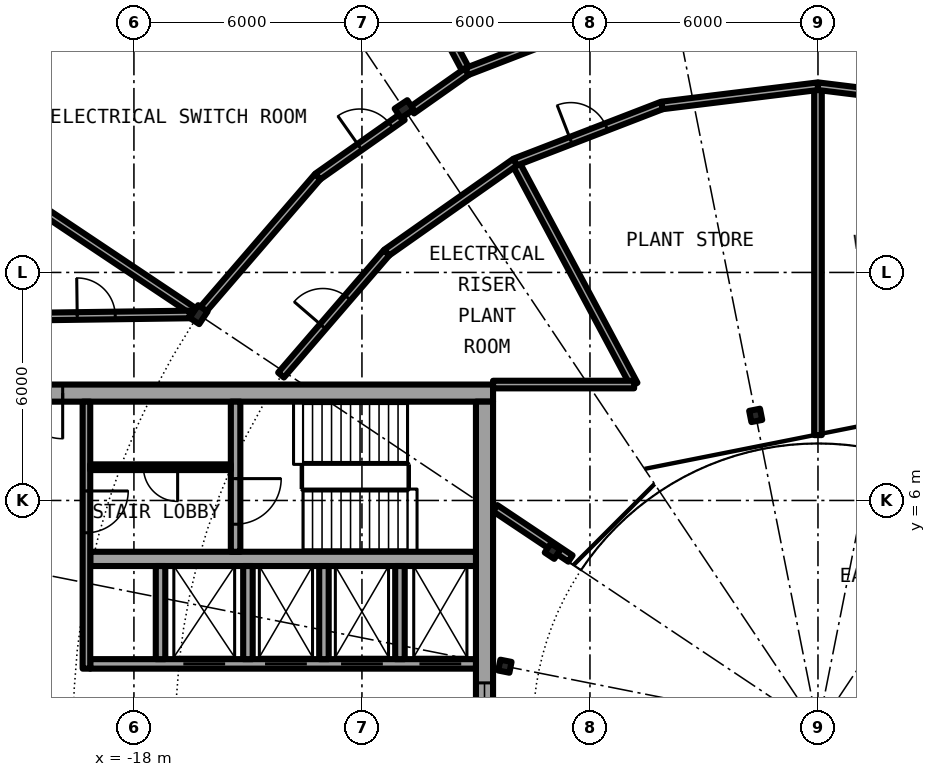
"""IFC4 building model, lengths in metres.
Left out: names, types, materials, properties, quantities, classifications, styles, units other than length and angle.
Written with IfcOpenShell. Run it as: python <this file> out.ifc"""

import sys

from ifc_helpers import new_model, si_unit, direction, frame, frame_2d, origin, origin_2d, place, context, subcontext, project, spatial, rectangle, i_section, extrude, element, fill, save


model = new_model("IFC4")
c1 = context("Model", 3, precision=1e-05, world=origin(), true_north=direction((0.0, 1.0)))
c2 = subcontext(c1, "Body", "Model", "MODEL_VIEW")
j1 = project(units=[si_unit("LENGTHUNIT", "METRE"), si_unit("PLANEANGLEUNIT", "RADIAN")], contexts=[c1])
p1 = place(None, origin())
s1 = spatial("IfcSite", under=j1, at=p1, CompositionType="ELEMENT")
p2 = place(p1, origin())
s2 = spatial("IfcBuilding", under=s1, at=p2, CompositionType="ELEMENT")
p3 = place(p2, frame((0.0, 0.0, 186.0)))
s3 = spatial("IfcBuildingStorey", under=s2, at=p3, CompositionType="ELEMENT", Elevation=186.0)
for number, where, z_axis, x_axis in (
    (1, (-10.889, 16.297, 0.0), (0.0, 0.0, 1.0), (-0.556, 0.831, 0.0)),
    (2, (-16.297, 10.889, 0.0), (0.0, 0.0, 1.0), (-0.831, 0.556, 0.0)),
):
    element("IfcColumn", number, at=place(p3, frame(where, z_axis=z_axis, x_axis=x_axis)), inside=s3, PredefinedType="COLUMN", context=c2, shape_type="SweptSolid", body=[
        extrude(i_section(OverallWidth=0.3, OverallDepth=0.4, WebThickness=0.013, FlangeThickness=0.024, FilletRadius=0.027, at=origin_2d()), origin(), (0.0, 0.0, 1.0), 4.2),
    ])
for number, where, z_axis, x_axis in (
    (3, (-1.639, 8.239, 0.0), (0.0, 0.0, 1.0), (-0.195, 0.981, 0.0)),
    (4, (-6.984, 4.667, 0.0), (0.0, 0.0, 1.0), (-0.831, 0.556, 0.0)),
    (5, (-8.239, 1.639, 0.0), (0.0, 0.0, 1.0), (-0.981, 0.195, 0.0)),
):
    element("IfcColumn", number, at=place(p3, frame(where, z_axis=z_axis, x_axis=x_axis)), inside=s3, PredefinedType="COLUMN", context=c2, shape_type="SweptSolid", body=[
        extrude(i_section(OverallWidth=0.3, OverallDepth=0.29, WebThickness=0.009, FlangeThickness=0.014, FilletRadius=0.027, at=origin_2d()), origin(), (0.0, 0.0, 1.0), 4.2),
    ])
p4 = place(p3, frame((-8.55, 8.825, 0.0), z_axis=(0.0, 0.0, 1.0), x_axis=(-1.0, 0.0, 0.0)))
e6 = element("IfcWall", 6, at=p4, inside=s3, PredefinedType="SHEAR", context=c2, shape_type="SweptSolid", body=[
    extrude(rectangle(XDim=13.5, YDim=0.45, at=frame_2d((6.75, 0.0))), origin(), (0.0, 0.0, 1.0), 4.2),
])
p5 = place(p4, frame((11.325, 0.0, 0.0)))
e7 = element("IfcOpeningElement", 7, at=p5, cuts=e6, PredefinedType="OPENING", context=c2, shape_type="SweptSolid", body=[
    extrude(rectangle(XDim=1.2, YDim=2.3, at=frame_2d((0.6, 1.15))), frame((0.0, 0.235, 0.0), z_axis=(0.0, -1.0, 0.0), x_axis=(1.0, 0.0, 0.0)), (0.0, 0.0, 1.0), 0.47),
])
p6 = place(p3, frame((-8.775, 8.6, 0.0), z_axis=(0.0, 0.0, 1.0), x_axis=(0.0, -1.0, 0.0)))
e8 = element("IfcWall", 8, at=p6, inside=s3, PredefinedType="SHEAR", context=c2, shape_type="SweptSolid", body=[
    extrude(rectangle(XDim=17.2, YDim=0.45, at=frame_2d((8.6, 0.0))), origin(), (0.0, 0.0, 1.0), 4.2),
])
p7 = place(p6, frame((7.4, 0.0, 0.1)))
e9 = element("IfcOpeningElement", 9, at=p7, cuts=e8, PredefinedType="OPENING", context=c2, shape_type="SweptSolid", body=[
    extrude(rectangle(XDim=2.4, YDim=2.2, at=frame_2d((1.2, 1.1))), frame((0.0, 0.235, 0.0), z_axis=(0.0, -1.0, 0.0), x_axis=(1.0, 0.0, 0.0)), (0.0, 0.0, 1.0), 0.47),
])
p8 = place(p3, frame((-9.0, 1.7, 0.0), z_axis=(0.0, 0.0, 1.0), x_axis=(-1.0, 0.0, 0.0)))
e10 = element("IfcWall", 10, at=p8, inside=s3, PredefinedType="SHEAR", context=c2, shape_type="SweptSolid", body=[
    extrude(rectangle(XDim=10.15, YDim=0.25, at=frame_2d((5.075, 0.0))), origin(), (0.0, 0.0, 1.0), 4.2),
])
p9 = place(p8, frame((0.387, 0.0, 0.0)))
e11 = element("IfcOpeningElement", 11, at=p9, cuts=e10, PredefinedType="OPENING", context=c2, shape_type="SweptSolid", body=[
    extrude(rectangle(XDim=1.1, YDim=2.3, at=frame_2d((0.55, 1.15))), frame((0.0, 0.135, 0.0), z_axis=(0.0, -1.0, 0.0), x_axis=(1.0, 0.0, 0.0)), (0.0, 0.0, 1.0), 0.27),
])
p10 = place(p8, frame((2.45, 0.0, 0.0)))
e12 = element("IfcOpeningElement", 12, at=p10, cuts=e10, PredefinedType="OPENING", context=c2, shape_type="SweptSolid", body=[
    extrude(rectangle(XDim=1.1, YDim=2.3, at=frame_2d((0.55, 1.15))), frame((0.0, 0.135, 0.0), z_axis=(0.0, -1.0, 0.0), x_axis=(1.0, 0.0, 0.0)), (0.0, 0.0, 1.0), 0.27),
])
p11 = place(p8, frame((4.45, 0.0, 0.0)))
e13 = element("IfcOpeningElement", 13, at=p11, cuts=e10, PredefinedType="OPENING", context=c2, shape_type="SweptSolid", body=[
    extrude(rectangle(XDim=1.1, YDim=2.3, at=frame_2d((0.55, 1.15))), frame((0.0, 0.135, 0.0), z_axis=(0.0, -1.0, 0.0), x_axis=(1.0, 0.0, 0.0)), (0.0, 0.0, 1.0), 0.27),
])
p12 = place(p8, frame((6.6, 0.0, 0.0)))
e14 = element("IfcOpeningElement", 14, at=p12, cuts=e10, PredefinedType="OPENING", context=c2, shape_type="SweptSolid", body=[
    extrude(rectangle(XDim=1.1, YDim=2.3, at=frame_2d((0.55, 1.15))), frame((0.0, 0.135, 0.0), z_axis=(0.0, -1.0, 0.0), x_axis=(1.0, 0.0, 0.0)), (0.0, 0.0, 1.0), 0.27),
])
p13 = place(p3, frame((-9.0, 4.462, 0.0), z_axis=(0.0, 0.0, 1.0), x_axis=(-1.0, 0.0, 0.0)))
e15 = element("IfcWall", 15, at=p13, inside=s3, PredefinedType="SHEAR", context=c2, shape_type="SweptSolid", body=[
    extrude(rectangle(XDim=10.15, YDim=0.375, at=frame_2d((5.075, 0.0))), origin(), (0.0, 0.0, 1.0), 4.2),
])
p14 = place(p3, frame((-15.325, 8.6, 0.0), z_axis=(0.0, 0.0, 1.0), x_axis=(0.0, -1.0, 0.0)))
e16 = element("IfcWall", 16, at=p14, inside=s3, PredefinedType="SHEAR", context=c2, shape_type="SweptSolid", body=[
    extrude(rectangle(XDim=3.95, YDim=0.25, at=frame_2d((1.975, 0.0))), origin(), (0.0, 0.0, 1.0), 4.2),
])
p15 = place(p14, frame((2.025, 0.0, 0.0)))
e17 = element("IfcOpeningElement", 17, at=p15, cuts=e16, PredefinedType="OPENING", context=c2, shape_type="SweptSolid", body=[
    extrude(rectangle(XDim=1.2, YDim=2.3, at=frame_2d((0.6, 1.15))), frame((0.0, 0.135, 0.0), z_axis=(0.0, -1.0, 0.0), x_axis=(1.0, 0.0, 0.0)), (0.0, 0.0, 1.0), 0.27),
])
for number, where, z_axis, x_axis in (
    (18, (-15.0, 1.825, 0.0), (0.0, 0.0, 1.0), (0.0, 1.0, 0.0)),
    (19, (-17.3, 1.825, 0.0), (0.0, 0.0, 1.0), (0.0, 1.0, 0.0)),
):
    element("IfcWall", number, at=place(p3, frame(where, z_axis=z_axis, x_axis=x_axis)), inside=s3, PredefinedType="SOLIDWALL", context=c2, shape_type="SweptSolid", body=[
        extrude(rectangle(XDim=2.45, YDim=0.25, at=frame_2d((1.225, 0.0))), origin(), (0.0, 0.0, 1.0), 3.85),
    ])
p16 = place(p3, frame((-19.25, 8.6, 0.0), z_axis=(0.0, 0.0, 1.0), x_axis=(0.0, -1.0, 0.0)))
e20 = element("IfcWall", 20, at=p16, inside=s3, PredefinedType="SOLIDWALL", context=c2, shape_type="SweptSolid", body=[
    extrude(rectangle(XDim=7.025, YDim=0.2, at=frame_2d((3.513, 0.0))), origin(), (0.0, 0.0, 1.0), 3.85),
])
p17 = place(p16, frame((2.35, 0.0, 0.0)))
e21 = element("IfcOpeningElement", 21, at=p17, cuts=e20, PredefinedType="OPENING", context=c2, shape_type="SweptSolid", body=[
    extrude(rectangle(XDim=1.1, YDim=2.3, at=frame_2d((0.55, 1.15))), frame((0.0, 0.11, 0.0), z_axis=(0.0, -1.0, 0.0), x_axis=(1.0, 0.0, 0.0)), (0.0, 0.0, 1.0), 0.22),
])
for number, where, z_axis, x_axis in (
    (22, (-11.0, 1.825, 0.0), (0.0, 0.0, 1.0), (0.0, 1.0, 0.0)),
    (23, (-13.0, 1.825, 0.0), (0.0, 0.0, 1.0), (0.0, 1.0, 0.0)),
):
    element("IfcWall", number, at=place(p3, frame(where, z_axis=z_axis, x_axis=x_axis)), inside=s3, PredefinedType="SOLIDWALL", context=c2, shape_type="SweptSolid", body=[
        extrude(rectangle(XDim=2.45, YDim=0.25, at=frame_2d((1.225, 0.0))), origin(), (0.0, 0.0, 1.0), 3.85),
    ])
p18 = place(p3, frame((-15.45, 6.875, 0.0), z_axis=(0.0, 0.0, 1.0), x_axis=(-1.0, 0.0, 0.0)))
e24 = element("IfcWall", 24, at=p18, inside=s3, PredefinedType="PARTITIONING", context=c2, shape_type="SweptSolid", body=[
    extrude(rectangle(XDim=3.7, YDim=0.15, at=frame_2d((1.85, 0.0))), origin(), (0.0, 0.0, 1.0), 3.85),
])
p19 = place(p18, frame((1.4, 0.0, 0.0)))
e25 = element("IfcOpeningElement", 25, at=p19, cuts=e24, PredefinedType="OPENING", context=c2, shape_type="SweptSolid", body=[
    extrude(rectangle(XDim=0.9, YDim=2.3, at=frame_2d((0.45, 1.15))), frame((0.0, 0.085, 0.0), z_axis=(0.0, -1.0, 0.0), x_axis=(1.0, 0.0, 0.0)), (0.0, 0.0, 1.0), 0.17),
])
p20 = place(p3, frame((-22.595, 15.098, 0.0), z_axis=(0.0, 0.0, 1.0), x_axis=(0.831433566583, -0.555624175463, 0.0)))
e26 = element("IfcWall", 26, at=p20, inside=s3, PredefinedType="PARTITIONING", context=c2, shape_type="SweptSolid", body=[
    extrude(rectangle(XDim=7.375, YDim=0.2, at=frame_2d((3.688, 0.0))), origin(), (0.0, 0.0, 1.0), 3.85),
])
p21 = place(p3, frame((-12.813, 23.965, 0.0), z_axis=(0.0, 0.0, 1.0), x_axis=(0.471439510802, -0.881898399848, 0.0)))
e27 = element("IfcWall", 27, at=p21, inside=s3, PredefinedType="PARTITIONING", context=c2, shape_type="SweptSolid", body=[
    extrude(rectangle(XDim=7.575, YDim=0.2, at=frame_2d((3.787, 0.0))), origin(), (0.0, 0.0, 1.0), 3.85),
])
p22 = place(p3, frame((-7.969, 14.903, 0.0), z_axis=(0.0, 0.0, 1.0), x_axis=(0.471496623847, -0.88186786635, 0.0)))
e28 = element("IfcWall", 28, at=p22, inside=s3, PredefinedType="PARTITIONING", context=c2, shape_type="SweptSolid", body=[
    extrude(rectangle(XDim=6.638, YDim=0.2, at=frame_2d((3.319, 0.0))), origin(), (0.0, 0.0, 1.0), 3.85),
])
p23 = place(p3, frame((0.0, 7.72, 0.0), z_axis=(0.0, 0.0, 1.0), x_axis=(0.0, 1.0, 0.0)))
e29 = element("IfcWall", 29, at=p23, inside=s3, PredefinedType="PARTITIONING", context=c2, shape_type="SweptSolid", body=[
    extrude(rectangle(XDim=9.18, YDim=0.2, at=frame_2d((4.59, 0.0))), origin(), (0.0, 0.0, 1.0), 3.85),
])
p24 = place(p3, frame((-6.513, 4.472, 0.0), z_axis=(0.0, 0.0, 1.0), x_axis=(-0.831403409976, 0.555669299026, 0.0)))
e30 = element("IfcWall", 30, at=p24, inside=s3, PredefinedType="PARTITIONING", context=c2, shape_type="SweptSolid", body=[
    extrude(rectangle(XDim=2.383, YDim=0.2, at=frame_2d((1.191, 0.0))), origin(), (0.0, 0.0, 1.0), 3.85),
])
p25 = place(p3, frame((-8.55, 9.05, 0.0), z_axis=(0.0, 0.0, 1.0), x_axis=(1.0, 0.0, 0.0)))
e31 = element("IfcWall", 31, at=p25, inside=s3, PredefinedType="PARTITIONING", context=c2, shape_type="SweptSolid", body=[
    extrude(rectangle(XDim=3.712, YDim=0.2, at=frame_2d((1.856, 0.0))), origin(), (0.0, 0.0, 1.0), 3.85),
])
p26 = place(p3, frame((-21.675, 10.825, 0.0), z_axis=(0.0, 0.0, 1.0), x_axis=(0.999909707888, 0.013437859594, 0.0)))
e32 = element("IfcWall", 32, at=p26, inside=s3, PredefinedType="PARTITIONING", context=c2, shape_type="SweptSolid", body=[
    extrude(rectangle(XDim=5.142, YDim=0.2, at=frame_2d((2.571, 0.0))), origin(), (0.0, 0.0, 1.0), 3.85),
])
p27 = place(p26, frame((2.183, 0.0, 0.0)))
e33 = element("IfcOpeningElement", 33, at=p27, cuts=e32, PredefinedType="OPENING", context=c2, shape_type="SweptSolid", body=[
    extrude(rectangle(XDim=1.0, YDim=2.3, at=frame_2d((0.5, 1.15))), frame((0.0, 0.11, 0.0), z_axis=(0.0, -1.0, 0.0), x_axis=(1.0, 0.0, 0.0)), (0.0, 0.0, 1.0), 0.22),
])
p28 = place(p3, frame((-14.129, 9.3, 0.0), z_axis=(0.0, 0.0, 1.0), x_axis=(0.65324486504, 0.757146713853, 0.0)))
e34 = element("IfcWall", 34, at=p28, inside=s3, PredefinedType="PARTITIONING", context=c2, shape_type="SweptSolid", body=[
    extrude(rectangle(XDim=4.255, YDim=0.2, at=frame_2d((2.128, 0.0))), origin(), (0.0, 0.0, 1.0), 3.85),
])
p29 = place(p28, frame((1.687, 0.0, 0.0)))
e35 = element("IfcOpeningElement", 35, at=p29, cuts=e34, PredefinedType="OPENING", context=c2, shape_type="SweptSolid", body=[
    extrude(rectangle(XDim=1.0, YDim=2.3, at=frame_2d((0.5, 1.15))), frame((0.0, 0.11, 0.0), z_axis=(0.0, -1.0, 0.0), x_axis=(1.0, 0.0, 0.0)), (0.0, 0.0, 1.0), 0.22),
])
p30 = place(p3, frame((-11.349, 12.522, 0.0), z_axis=(0.0, 0.0, 1.0), x_axis=(0.817567680547, 0.575832517079, 0.0)))
e36 = element("IfcWall", 36, at=p30, inside=s3, PredefinedType="PARTITIONING", context=c2, shape_type="SweptSolid", body=[
    extrude(rectangle(XDim=4.137, YDim=0.2, at=frame_2d((2.068, 0.0))), origin(), (0.0, 0.0, 1.0), 3.85),
])
p31 = place(p3, frame((-7.967, 14.904, 0.0), z_axis=(0.0, 0.0, 1.0), x_axis=(0.932943640288, 0.360022449363, 0.0)))
e37 = element("IfcWall", 37, at=p31, inside=s3, PredefinedType="PARTITIONING", context=c2, shape_type="SweptSolid", body=[
    extrude(rectangle(XDim=4.139, YDim=0.2, at=frame_2d((2.069, 0.0))), origin(), (0.0, 0.0, 1.0), 3.85),
])
p32 = place(p31, frame((1.569, 0.0, 0.0)))
e38 = element("IfcOpeningElement", 38, at=p32, cuts=e37, PredefinedType="OPENING", context=c2, shape_type="SweptSolid", body=[
    extrude(rectangle(XDim=1.0, YDim=2.3, at=frame_2d((0.5, 1.15))), frame((0.0, 0.11, 0.0), z_axis=(0.0, -1.0, 0.0), x_axis=(1.0, 0.0, 0.0)), (0.0, 0.0, 1.0), 0.22),
])
for number, where, z_axis, x_axis in (
    (39, (-4.106, 16.394, 0.0), (0.0, 0.0, 1.0), (0.992, 0.122, 0.0)),
    (40, (0.0, 16.9, 0.0), (0.0, 0.0, 1.0), (0.992, -0.122, 0.0)),
):
    element("IfcWall", number, at=place(p3, frame(where, z_axis=z_axis, x_axis=x_axis)), inside=s3, PredefinedType="PARTITIONING", context=c2, shape_type="SweptSolid", body=[
        extrude(rectangle(XDim=4.137, YDim=0.2, at=frame_2d((2.068, 0.0))), origin(), (0.0, 0.0, 1.0), 3.85),
    ])
p33 = place(p3, frame((-16.198, 11.004, 0.0), z_axis=(0.0, 0.0, 1.0), x_axis=(0.653094461639, 0.757276451619, 0.0)))
e41 = element("IfcWall", 41, at=p33, inside=s3, PredefinedType="PARTITIONING", context=c2, shape_type="SweptSolid", body=[
    extrude(rectangle(XDim=4.647, YDim=0.2, at=frame_2d((2.323, 0.0))), origin(), (0.0, 0.0, 1.0), 3.6),
])
p34 = place(p3, frame((-13.163, 14.523, 0.0), z_axis=(0.0, 0.0, 1.0), x_axis=(0.817664396292, 0.57569517545, 0.0)))
e42 = element("IfcWall", 42, at=p34, inside=s3, PredefinedType="PARTITIONING", context=c2, shape_type="SweptSolid", body=[
    extrude(rectangle(XDim=2.727, YDim=0.2, at=frame_2d((1.364, 0.0))), origin(), (0.0, 0.0, 1.0), 3.6),
])
p35 = place(p34, frame((1.35, 0.0, 0.0)))
e43 = element("IfcOpeningElement", 43, at=p35, cuts=e42, PredefinedType="OPENING", context=c2, shape_type="SweptSolid", body=[
    extrude(rectangle(XDim=1.0, YDim=2.3, at=frame_2d((0.5, 1.15))), frame((0.0, 0.11, 0.0), z_axis=(0.0, -1.0, 0.0), x_axis=(1.0, 0.0, 0.0)), (0.0, 0.0, 1.0), 0.22),
])
p36 = place(p3, frame((-10.688, 16.266, 0.0), z_axis=(0.0, 0.0, 1.0), x_axis=(0.817772792535, 0.575541188613, 0.0)))
e44 = element("IfcWall", 44, at=p36, inside=s3, PredefinedType="PARTITIONING", context=c2, shape_type="SweptSolid", body=[
    extrude(rectangle(XDim=1.772, YDim=0.2, at=frame_2d((0.886, 0.0))), origin(), (0.0, 0.0, 1.0), 3.6),
])
p37 = place(p3, frame((-9.239, 17.286, 0.0), z_axis=(0.0, 0.0, 1.0), x_axis=(0.932988479706, 0.359906233255, 0.0)))
e45 = element("IfcWall", 45, at=p37, inside=s3, PredefinedType="PARTITIONING", context=c2, shape_type="SweptSolid", body=[
    extrude(rectangle(XDim=4.799, YDim=0.2, at=frame_2d((2.399, 0.0))), origin(), (0.0, 0.0, 1.0), 3.85),
])
p38 = place(p37, frame((1.899, 0.0, 0.0)))
e46 = element("IfcOpeningElement", 46, at=p38, cuts=e45, PredefinedType="OPENING", context=c2, shape_type="SweptSolid", body=[
    extrude(rectangle(XDim=1.0, YDim=2.3, at=frame_2d((0.5, 1.15))), frame((0.0, 0.11, 0.0), z_axis=(0.0, -1.0, 0.0), x_axis=(1.0, 0.0, 0.0)), (0.0, 0.0, 1.0), 0.22),
])
p39 = place(p9, origin())
e47 = element("IfcDoor", 47, at=p39, inside=s3, OperationType="DOUBLE_DOOR_SLIDING", PredefinedType="DOOR", context=c2, shape_type="SweptSolid", body=[
    extrude(rectangle(XDim=1.1, YDim=2.3, at=frame_2d((0.55, 1.15))), frame((0.0, 0.025, 0.0), z_axis=(0.0, -1.0, 0.0), x_axis=(1.0, 0.0, 0.0)), (0.0, 0.0, 1.0), 0.05),
])
fill(e11, e47)
p40 = place(p10, origin())
e48 = element("IfcDoor", 48, at=p40, inside=s3, OperationType="DOUBLE_DOOR_SLIDING", PredefinedType="DOOR", context=c2, shape_type="SweptSolid", body=[
    extrude(rectangle(XDim=1.1, YDim=2.3, at=frame_2d((0.55, 1.15))), frame((0.0, 0.025, 0.0), z_axis=(0.0, -1.0, 0.0), x_axis=(1.0, 0.0, 0.0)), (0.0, 0.0, 1.0), 0.05),
])
fill(e12, e48)
p41 = place(p11, origin())
e49 = element("IfcDoor", 49, at=p41, inside=s3, OperationType="DOUBLE_DOOR_SLIDING", PredefinedType="DOOR", context=c2, shape_type="SweptSolid", body=[
    extrude(rectangle(XDim=1.1, YDim=2.3, at=frame_2d((0.55, 1.15))), frame((0.0, 0.025, 0.0), z_axis=(0.0, -1.0, 0.0), x_axis=(1.0, 0.0, 0.0)), (0.0, 0.0, 1.0), 0.05),
])
fill(e13, e49)
p42 = place(p12, origin())
e50 = element("IfcDoor", 50, at=p42, inside=s3, OperationType="DOUBLE_DOOR_SLIDING", PredefinedType="DOOR", context=c2, shape_type="SweptSolid", body=[
    extrude(rectangle(XDim=1.1, YDim=2.3, at=frame_2d((0.55, 1.15))), frame((0.0, 0.025, 0.0), z_axis=(0.0, -1.0, 0.0), x_axis=(1.0, 0.0, 0.0)), (0.0, 0.0, 1.0), 0.05),
])
fill(e14, e50)
p43 = place(p19, origin())
e51 = element("IfcDoor", 51, at=p43, inside=s3, OperationType="SINGLE_SWING_LEFT", PredefinedType="DOOR", context=c2, shape_type="SweptSolid", body=[
    extrude(rectangle(XDim=0.9, YDim=2.3, at=frame_2d((0.45, 1.15))), frame((0.0, 0.025, 0.0), z_axis=(0.0, -1.0, 0.0), x_axis=(1.0, 0.0, 0.0)), (0.0, 0.0, 1.0), 0.05),
])
fill(e25, e51)
p44 = place(p15, origin())
e52 = element("IfcDoor", 52, at=p44, inside=s3, OperationType="SINGLE_SWING_LEFT", PredefinedType="DOOR", context=c2, shape_type="SweptSolid", body=[
    extrude(rectangle(XDim=1.2, YDim=2.3, at=frame_2d((0.6, 1.15))), frame((0.0, 0.025, 0.0), z_axis=(0.0, -1.0, 0.0), x_axis=(1.0, 0.0, 0.0)), (0.0, 0.0, 1.0), 0.05),
])
fill(e17, e52)
p45 = place(p17, origin())
e53 = element("IfcDoor", 53, at=p45, inside=s3, OperationType="SINGLE_SWING_RIGHT", PredefinedType="DOOR", context=c2, shape_type="SweptSolid", body=[
    extrude(rectangle(XDim=1.1, YDim=2.3, at=frame_2d((0.55, 1.15))), frame((0.0, 0.025, 0.0), z_axis=(0.0, -1.0, 0.0), x_axis=(1.0, 0.0, 0.0)), (0.0, 0.0, 1.0), 0.05),
])
fill(e21, e53)
p46 = place(p5, origin())
e54 = element("IfcDoor", 54, at=p46, inside=s3, OperationType="SINGLE_SWING_LEFT", PredefinedType="DOOR", context=c2, shape_type="SweptSolid", body=[
    extrude(rectangle(XDim=1.2, YDim=2.3, at=frame_2d((0.6, 1.15))), frame((0.0, 0.025, 0.0), z_axis=(0.0, -1.0, 0.0), x_axis=(1.0, 0.0, 0.0)), (0.0, 0.0, 1.0), 0.05),
])
fill(e7, e54)
p47 = place(p7, origin())
e55 = element("IfcWindow", 55, at=p47, inside=s3, PartitioningType="SINGLE_PANEL", PredefinedType="WINDOW", context=c2, shape_type="SweptSolid", body=[
    extrude(rectangle(XDim=2.4, YDim=2.2, at=frame_2d((1.2, 1.1))), frame((0.0, 0.03, 0.0), z_axis=(0.0, -1.0, 0.0), x_axis=(1.0, 0.0, 0.0)), (0.0, 0.0, 1.0), 0.06),
])
fill(e9, e55)
p48 = place(p35, origin())
e56 = element("IfcDoor", 56, at=p48, inside=s3, OperationType="SINGLE_SWING_RIGHT", PredefinedType="DOOR", context=c2, shape_type="SweptSolid", body=[
    extrude(rectangle(XDim=1.0, YDim=2.3, at=frame_2d((0.5, 1.15))), frame((0.0, 0.025, 0.0), z_axis=(0.0, -1.0, 0.0), x_axis=(1.0, 0.0, 0.0)), (0.0, 0.0, 1.0), 0.05),
])
fill(e43, e56)
p49 = place(p32, origin())
e57 = element("IfcDoor", 57, at=p49, inside=s3, OperationType="SINGLE_SWING_RIGHT", PredefinedType="DOOR", context=c2, shape_type="SweptSolid", body=[
    extrude(rectangle(XDim=1.0, YDim=2.3, at=frame_2d((0.5, 1.15))), frame((0.0, 0.025, 0.0), z_axis=(0.0, -1.0, 0.0), x_axis=(1.0, 0.0, 0.0)), (0.0, 0.0, 1.0), 0.05),
])
fill(e38, e57)
p50 = place(p29, origin())
e58 = element("IfcDoor", 58, at=p50, inside=s3, OperationType="SINGLE_SWING_RIGHT", PredefinedType="DOOR", context=c2, shape_type="SweptSolid", body=[
    extrude(rectangle(XDim=1.0, YDim=2.3, at=frame_2d((0.5, 1.15))), frame((0.0, 0.025, 0.0), z_axis=(0.0, -1.0, 0.0), x_axis=(1.0, 0.0, 0.0)), (0.0, 0.0, 1.0), 0.05),
])
fill(e35, e58)
p51 = place(p27, origin())
e59 = element("IfcDoor", 59, at=p51, inside=s3, OperationType="SINGLE_SWING_RIGHT", PredefinedType="DOOR", context=c2, shape_type="SweptSolid", body=[
    extrude(rectangle(XDim=1.0, YDim=2.3, at=frame_2d((0.5, 1.15))), frame((0.0, 0.025, 0.0), z_axis=(0.0, -1.0, 0.0), x_axis=(1.0, 0.0, 0.0)), (0.0, 0.0, 1.0), 0.05),
])
fill(e33, e59)
save(model, sys.argv[1])
